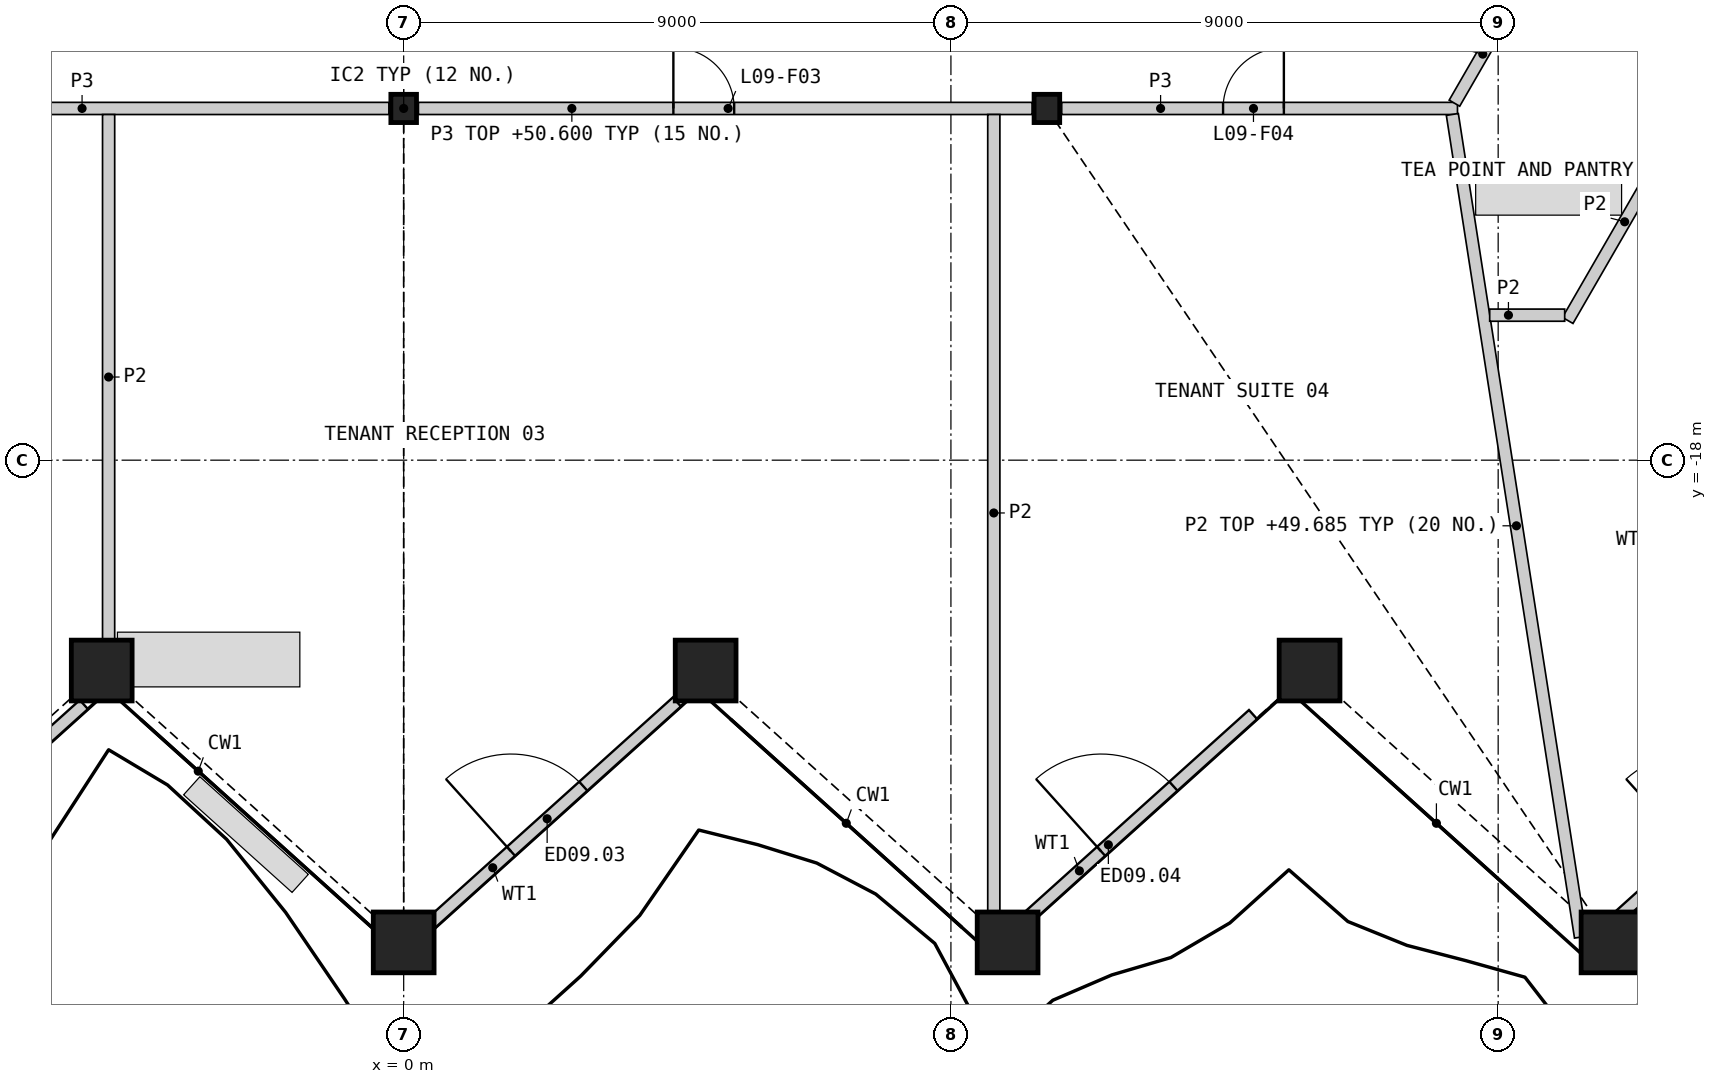
"""IFC4 building model, lengths in metres.
Left out: names, types, materials, properties, quantities, classifications, styles, units other than length and angle.
Written with IfcOpenShell. Run it as: python <this file> out.ifc"""

import sys

from ifc_helpers import new_model, si_unit, direction, frame, frame_2d, origin, origin_2d, place, context, subcontext, project, spatial, rectangle, hollow_rectangle, i_section, extrude, element, fill, save


model = new_model("IFC4")
c1 = context("Model", 3, precision=1e-05, world=origin(), true_north=direction((0.0, 1.0)))
c2 = subcontext(c1, "Body", "Model", "MODEL_VIEW")
j1 = project(units=[si_unit("LENGTHUNIT", "METRE"), si_unit("PLANEANGLEUNIT", "RADIAN")], contexts=[c1])
p1 = place(None, origin())
s1 = spatial("IfcSite", under=j1, at=p1, CompositionType="ELEMENT")
p2 = place(p1, origin())
s2 = spatial("IfcBuilding", under=s1, at=p2, CompositionType="ELEMENT")
p3 = place(p2, frame((0.0, 0.0, 46.8)))
s3 = spatial("IfcBuildingStorey", under=s2, at=p3, CompositionType="ELEMENT", Elevation=46.8)
for number, where, z_axis, x_axis in (
    (1, (-4.966, -21.46, 0.0), (0.0, 0.0, 1.0), (1.0, 0.0, 0.0)),
    (2, (0.0, -25.931, 0.0), (0.0, 0.0, 1.0), (1.0, 0.0, 0.0)),
    (3, (4.966, -21.46, 0.0), (0.0, 0.0, 1.0), (1.0, 0.0, 0.0)),
    (4, (9.932, -25.931, 0.0), (0.0, 0.0, 1.0), (1.0, 0.0, 0.0)),
    (5, (14.898, -21.46, 0.0), (0.0, 0.0, 1.0), (1.0, 0.0, 0.0)),
    (6, (19.864, -25.931, 0.0), (0.0, 0.0, 1.0), (1.0, 0.0, 0.0)),
):
    element("IfcColumn", number, at=place(p3, frame(where, z_axis=z_axis, x_axis=x_axis)), inside=s3, PredefinedType="COLUMN", context=c2, shape_type="SweptSolid", body=[
        extrude(hollow_rectangle(XDim=1.0, YDim=1.0, WallThickness=0.07, at=origin_2d()), origin(), (0.0, 0.0, 1.0), 4.2),
    ])
for number, where, z_axis, x_axis in (
    (7, (0.0, -12.215, 0.0), (0.0, 0.0, 1.0), (1.0, 0.0, 0.0)),
    (8, (10.578, -12.215, 0.0), (0.0, 0.0, 1.0), (1.0, 0.0, 0.0)),
):
    element("IfcColumn", number, at=place(p3, frame(where, z_axis=z_axis, x_axis=x_axis)), inside=s3, PredefinedType="COLUMN", context=c2, shape_type="SweptSolid", body=[
        extrude(i_section(OverallWidth=0.421, OverallDepth=0.465, WebThickness=0.045, FlangeThickness=0.072, at=origin_2d()), origin(), (0.0, 0.0, 1.0), 4.2),
    ])
p4 = place(p3, frame((-9.379, -25.728, 0.0), z_axis=(0.0, 0.0, 1.0), x_axis=(0.743160522465, 0.669113172677, 0.0)))
e9 = element("IfcWall", 9, at=p4, inside=s3, PredefinedType="SOLIDWALL", context=c2, shape_type="SweptSolid", body=[
    extrude(rectangle(XDim=5.542, YDim=0.2, at=frame_2d((2.771, 0.0))), origin(), (0.0, 0.0, 1.0), 3.189),
])
p5 = place(p4, frame((1.935, 0.0, 0.0)))
e10 = element("IfcOpeningElement", 10, at=p5, cuts=e9, PredefinedType="OPENING", context=c2, shape_type="SweptSolid", body=[
    extrude(rectangle(XDim=1.6, YDim=2.4, at=frame_2d((0.8, 1.2))), frame((0.0, 0.11, 0.0), z_axis=(0.0, -1.0, 0.0), x_axis=(1.0, 0.0, 0.0)), (0.0, 0.0, 1.0), 0.22),
])
p6 = place(p3, frame((0.456, -25.612, 0.0), z_axis=(0.0, 0.0, 1.0), x_axis=(0.743166762424, 0.669106242108, 0.0)))
e11 = element("IfcWall", 11, at=p6, inside=s3, PredefinedType="SOLIDWALL", context=c2, shape_type="SweptSolid", body=[
    extrude(rectangle(XDim=5.433, YDim=0.2, at=frame_2d((2.716, 0.0))), origin(), (0.0, 0.0, 1.0), 3.189),
])
p7 = place(p6, frame((1.762, 0.0, 0.0)))
e12 = element("IfcOpeningElement", 12, at=p7, cuts=e11, PredefinedType="OPENING", context=c2, shape_type="SweptSolid", body=[
    extrude(rectangle(XDim=1.6, YDim=2.4, at=frame_2d((0.8, 1.2))), frame((0.0, 0.11, 0.0), z_axis=(0.0, -1.0, 0.0), x_axis=(1.0, 0.0, 0.0)), (0.0, 0.0, 1.0), 0.22),
])
p8 = place(p3, frame((10.161, -25.612, 0.0), z_axis=(0.0, 0.0, 1.0), x_axis=(0.743159085791, 0.669114768337, 0.0)))
e13 = element("IfcWall", 13, at=p8, inside=s3, PredefinedType="SOLIDWALL", context=c2, shape_type="SweptSolid", body=[
    extrude(rectangle(XDim=5.124, YDim=0.2, at=frame_2d((2.562, 0.0))), origin(), (0.0, 0.0, 1.0), 3.189),
])
p9 = place(p8, frame((1.762, 0.0, 0.0)))
e14 = element("IfcOpeningElement", 14, at=p9, cuts=e13, PredefinedType="OPENING", context=c2, shape_type="SweptSolid", body=[
    extrude(rectangle(XDim=1.6, YDim=2.4, at=frame_2d((0.8, 1.2))), frame((0.0, 0.11, 0.0), z_axis=(0.0, -1.0, 0.0), x_axis=(1.0, 0.0, 0.0)), (0.0, 0.0, 1.0), 0.22),
])
p10 = place(p3, frame((19.866, -25.612, 0.0), z_axis=(0.0, 0.0, 1.0), x_axis=(0.743159085791, 0.669114768337, 0.0)))
e15 = element("IfcWall", 15, at=p10, inside=s3, PredefinedType="SOLIDWALL", context=c2, shape_type="SweptSolid", body=[
    extrude(rectangle(XDim=5.124, YDim=0.2, at=frame_2d((2.562, 0.0))), origin(), (0.0, 0.0, 1.0), 3.189),
])
p11 = place(p10, frame((1.762, 0.0, 0.0)))
e16 = element("IfcOpeningElement", 16, at=p11, cuts=e15, PredefinedType="OPENING", context=c2, shape_type="SweptSolid", body=[
    extrude(rectangle(XDim=1.6, YDim=2.4, at=frame_2d((0.8, 1.2))), frame((0.0, 0.11, 0.0), z_axis=(0.0, -1.0, 0.0), x_axis=(1.0, 0.0, 0.0)), (0.0, 0.0, 1.0), 0.22),
])
p12 = place(p3, frame((0.242, -12.215, 0.0), z_axis=(0.0, 0.0, 1.0), x_axis=(1.0, 0.0, 0.0)))
e17 = element("IfcWall", 17, at=p12, inside=s3, PredefinedType="PARTITIONING", context=c2, shape_type="SweptSolid", body=[
    extrude(rectangle(XDim=10.094, YDim=0.2, at=frame_2d((5.047, 0.0))), origin(), (0.0, 0.0, 1.0), 3.8),
])
p13 = place(p12, frame((4.193, 0.0, 0.0)))
e18 = element("IfcOpeningElement", 18, at=p13, cuts=e17, PredefinedType="OPENING", context=c2, shape_type="SweptSolid", body=[
    extrude(rectangle(XDim=1.0, YDim=2.1, at=frame_2d((0.5, 1.05))), frame((0.0, 0.11, 0.0), z_axis=(0.0, -1.0, 0.0), x_axis=(1.0, 0.0, 0.0)), (0.0, 0.0, 1.0), 0.22),
])
p14 = place(p3, frame((-10.336, -12.215, 0.0), z_axis=(0.0, 0.0, 1.0), x_axis=(1.0, 0.0, 0.0)))
e19 = element("IfcWall", 19, at=p14, inside=s3, PredefinedType="PARTITIONING", context=c2, shape_type="SweptSolid", body=[
    extrude(rectangle(XDim=10.094, YDim=0.2, at=frame_2d((5.047, 0.0))), origin(), (0.0, 0.0, 1.0), 3.8),
])
p15 = place(p14, frame((2.272, 0.0, 0.0)))
e20 = element("IfcOpeningElement", 20, at=p15, cuts=e19, PredefinedType="OPENING", context=c2, shape_type="SweptSolid", body=[
    extrude(rectangle(XDim=1.0, YDim=2.1, at=frame_2d((0.5, 1.05))), frame((0.0, 0.11, 0.0), z_axis=(0.0, -1.0, 0.0), x_axis=(1.0, 0.0, 0.0)), (0.0, 0.0, 1.0), 0.22),
])
p16 = place(p3, frame((10.821, -12.215, 0.0), z_axis=(0.0, 0.0, 1.0), x_axis=(1.0, 0.0, 0.0)))
e21 = element("IfcWall", 21, at=p16, inside=s3, PredefinedType="PARTITIONING", context=c2, shape_type="SweptSolid", body=[
    extrude(rectangle(XDim=6.51, YDim=0.2, at=frame_2d((3.255, 0.0))), origin(), (0.0, 0.0, 1.0), 3.8),
])
p17 = place(p16, frame((2.655, 0.0, 0.0)))
e22 = element("IfcOpeningElement", 22, at=p17, cuts=e21, PredefinedType="OPENING", context=c2, shape_type="SweptSolid", body=[
    extrude(rectangle(XDim=1.0, YDim=2.1, at=frame_2d((0.5, 1.05))), frame((0.0, 0.11, 0.0), z_axis=(0.0, -1.0, 0.0), x_axis=(1.0, 0.0, 0.0)), (0.0, 0.0, 1.0), 0.22),
])
p18 = place(p3, frame((17.281, -12.128, 0.0), z_axis=(0.0, 0.0, 1.0), x_axis=(0.499958791762, 0.866049194065, 0.0)))
e23 = element("IfcWall", 23, at=p18, inside=s3, PredefinedType="PARTITIONING", context=c2, shape_type="SweptSolid", body=[
    extrude(rectangle(XDim=3.726, YDim=0.2, at=frame_2d((1.863, 0.0))), origin(), (0.0, 0.0, 1.0), 3.8),
])
p19 = place(p18, frame((1.388, 0.0, 0.0)))
e24 = element("IfcOpeningElement", 24, at=p19, cuts=e23, PredefinedType="OPENING", context=c2, shape_type="SweptSolid", body=[
    extrude(rectangle(XDim=0.95, YDim=2.1, at=frame_2d((0.475, 1.05))), frame((0.0, 0.11, 0.0), z_axis=(0.0, -1.0, 0.0), x_axis=(1.0, 0.0, 0.0)), (0.0, 0.0, 1.0), 0.22),
])
p20 = place(p3, frame((17.246, -12.314, 0.0), z_axis=(0.0, 0.0, 1.0), x_axis=(0.153927101979, -0.98808220674, 0.0)))
e25 = element("IfcWall", 25, at=p20, inside=s3, PredefinedType="PARTITIONING", context=c2, shape_type="SweptSolid", body=[
    extrude(rectangle(XDim=13.694, YDim=0.2, at=frame_2d((6.847, 0.0))), origin(), (0.0, 0.0, 1.0), 2.885),
])
p21 = place(p3, frame((9.705, -25.421, 0.0), z_axis=(0.0, 0.0, 1.0), x_axis=(0.0, 1.0, 0.0)))
e26 = element("IfcWall", 26, at=p21, inside=s3, PredefinedType="PARTITIONING", context=c2, shape_type="SweptSolid", body=[
    extrude(rectangle(XDim=13.106, YDim=0.2, at=frame_2d((6.553, 0.0))), origin(), (0.0, 0.0, 1.0), 2.885),
])
p22 = place(p3, frame((-4.853, -20.95, 0.0), z_axis=(0.0, 0.0, 1.0), x_axis=(0.0, 1.0, 0.0)))
e27 = element("IfcWall", 27, at=p22, inside=s3, PredefinedType="PARTITIONING", context=c2, shape_type="SweptSolid", body=[
    extrude(rectangle(XDim=8.635, YDim=0.2, at=frame_2d((4.317, 0.0))), origin(), (0.0, 0.0, 1.0), 2.885),
])
p23 = place(p3, frame((19.144, -15.702, 0.0), z_axis=(0.0, 0.0, 1.0), x_axis=(0.500028947347, 0.866008690381, 0.0)))
e28 = element("IfcWall", 28, at=p23, inside=s3, PredefinedType="PARTITIONING", context=c2, shape_type="SweptSolid", body=[
    extrude(rectangle(XDim=3.746, YDim=0.2, at=frame_2d((1.873, 0.0))), origin(), (0.0, 0.0, 1.0), 2.885),
])
p24 = place(p3, frame((17.861, -15.615, 0.0), z_axis=(0.0, 0.0, 1.0), x_axis=(1.0, 0.0, 0.0)))
e29 = element("IfcWall", 29, at=p24, inside=s3, PredefinedType="PARTITIONING", context=c2, shape_type="SweptSolid", body=[
    extrude(rectangle(XDim=1.233, YDim=0.2, at=frame_2d((0.617, 0.0))), origin(), (0.0, 0.0, 1.0), 2.885),
])
p25 = place(p7, origin())
e30 = element("IfcDoor", 30, at=p25, inside=s3, OperationType="DOUBLE_DOOR_SINGLE_SWING", PredefinedType="DOOR", context=c2, shape_type="SweptSolid", body=[
    extrude(rectangle(XDim=1.6, YDim=2.4, at=frame_2d((0.8, 1.2))), frame((0.0, 0.025, 0.0), z_axis=(0.0, -1.0, 0.0), x_axis=(1.0, 0.0, 0.0)), (0.0, 0.0, 1.0), 0.05),
])
fill(e12, e30)
p26 = place(p9, origin())
e31 = element("IfcDoor", 31, at=p26, inside=s3, OperationType="DOUBLE_DOOR_SINGLE_SWING", PredefinedType="DOOR", context=c2, shape_type="SweptSolid", body=[
    extrude(rectangle(XDim=1.6, YDim=2.4, at=frame_2d((0.8, 1.2))), frame((0.0, 0.025, 0.0), z_axis=(0.0, -1.0, 0.0), x_axis=(1.0, 0.0, 0.0)), (0.0, 0.0, 1.0), 0.05),
])
fill(e14, e31)
p27 = place(p13, origin())
e32 = element("IfcDoor", 32, at=p27, inside=s3, OperationType="SINGLE_SWING_LEFT", PredefinedType="DOOR", context=c2, shape_type="SweptSolid", body=[
    extrude(rectangle(XDim=1.0, YDim=2.1, at=frame_2d((0.5, 1.05))), frame((0.0, 0.025, 0.0), z_axis=(0.0, -1.0, 0.0), x_axis=(1.0, 0.0, 0.0)), (0.0, 0.0, 1.0), 0.05),
])
fill(e18, e32)
p28 = place(p17, origin())
e33 = element("IfcDoor", 33, at=p28, inside=s3, OperationType="SINGLE_SWING_RIGHT", PredefinedType="DOOR", context=c2, shape_type="SweptSolid", body=[
    extrude(rectangle(XDim=1.0, YDim=2.1, at=frame_2d((0.5, 1.05))), frame((0.0, 0.025, 0.0), z_axis=(0.0, -1.0, 0.0), x_axis=(1.0, 0.0, 0.0)), (0.0, 0.0, 1.0), 0.05),
])
fill(e22, e33)
save(model, sys.argv[1])
